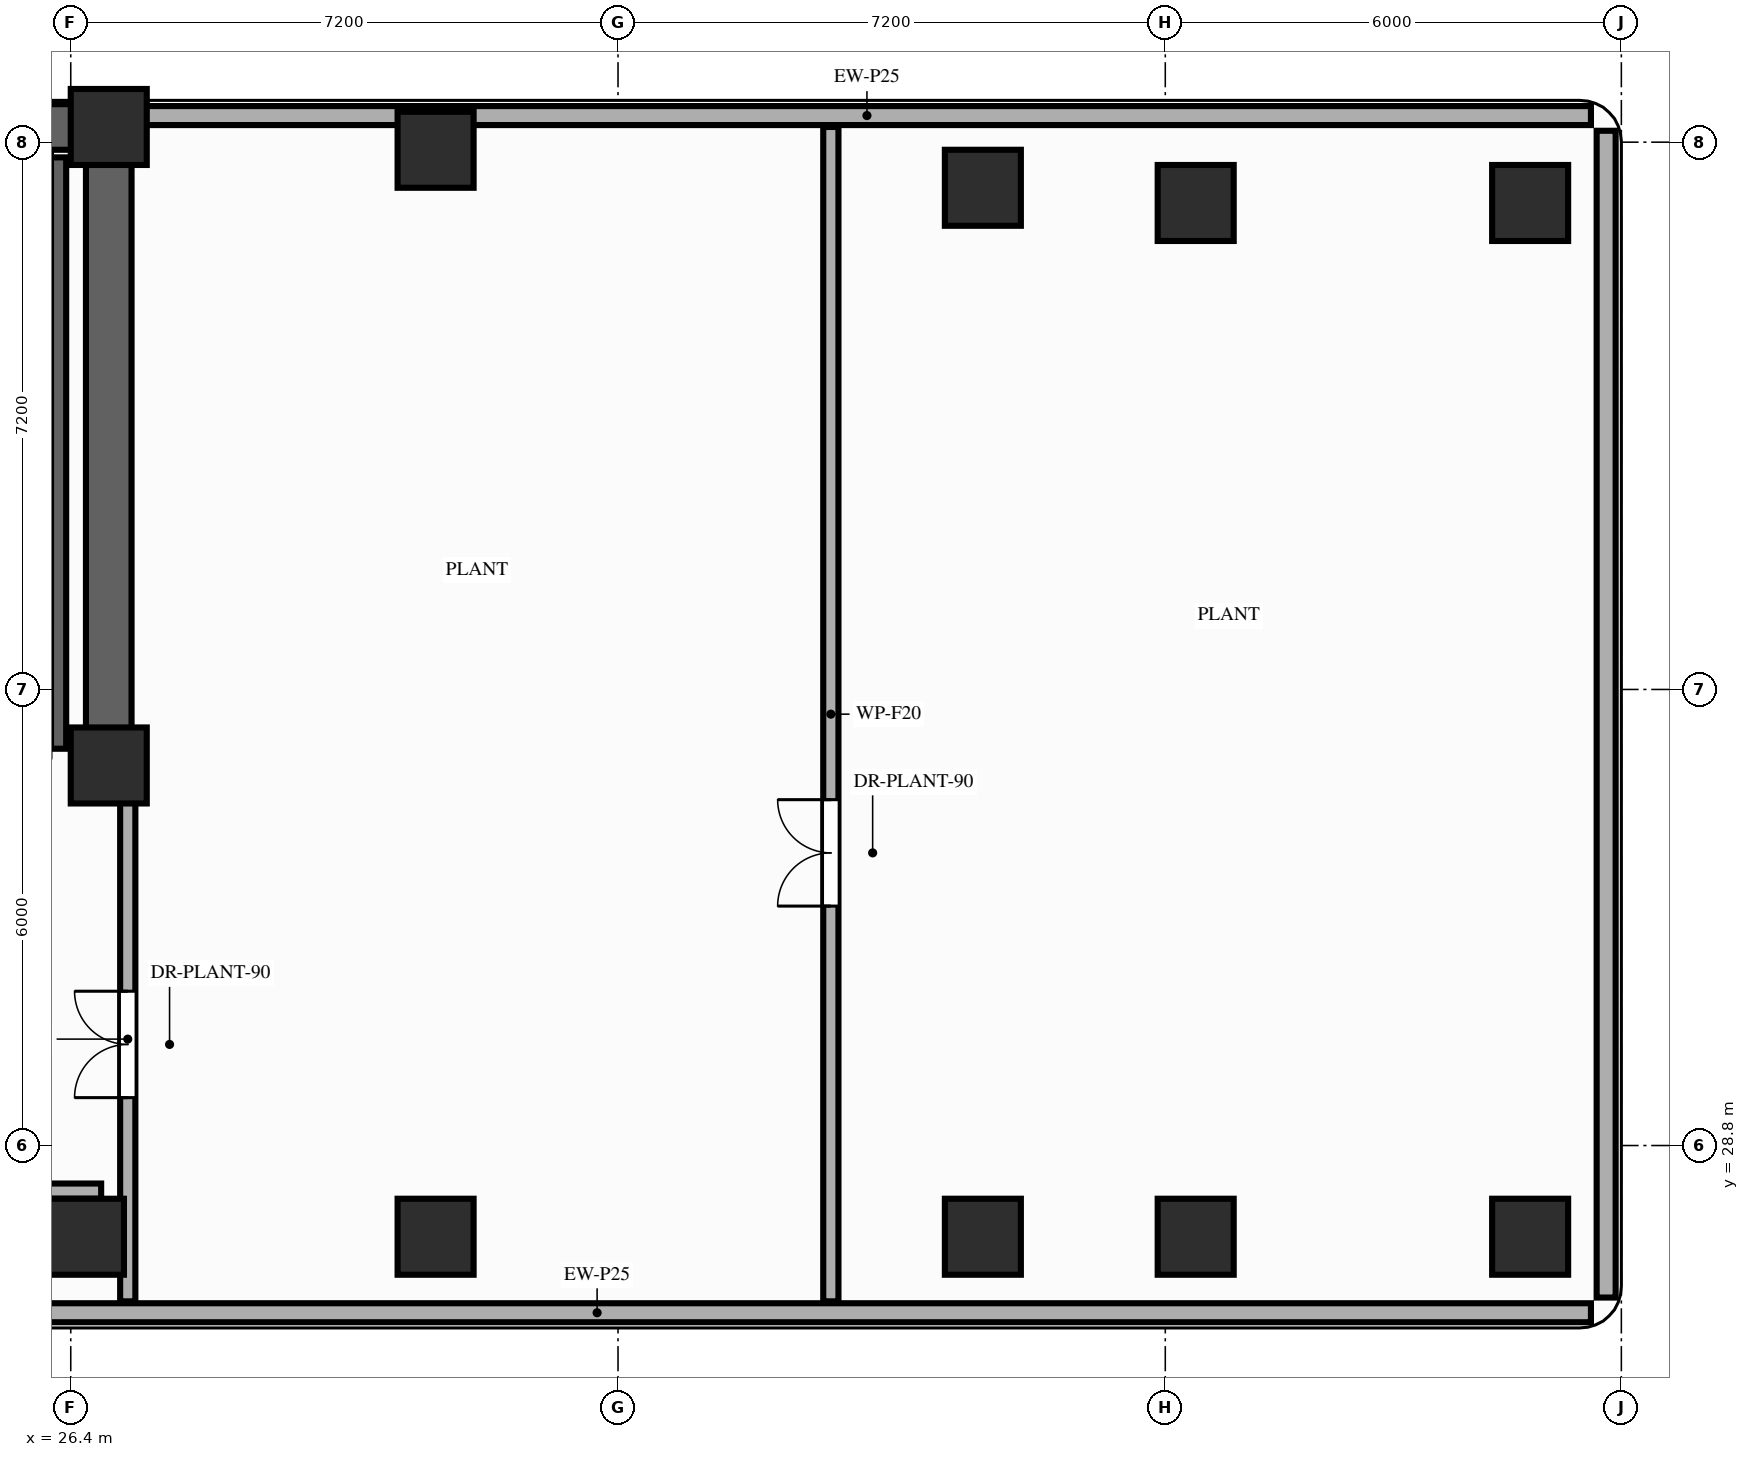
"""IFC4 building model, lengths in metres.
Left out: names, types, materials, properties, quantities, classifications, styles, units other than length and angle.
Written with IfcOpenShell. Run it as: python <this file> out.ifc"""

import sys

from ifc_helpers import new_model, si_unit, direction, frame, frame_2d, origin, origin_2d, place, context, subcontext, project, spatial, rectangle, extrude, element, fill, save


model = new_model("IFC4")
c1 = context("Model", 3, precision=1e-05, world=origin(), true_north=direction((0.0, 1.0)))
c2 = subcontext(c1, "Body", "Model", "MODEL_VIEW")
j1 = project(units=[si_unit("LENGTHUNIT", "METRE"), si_unit("PLANEANGLEUNIT", "RADIAN")], contexts=[c1])
p1 = place(None, origin())
s1 = spatial("IfcSite", under=j1, at=p1, CompositionType="ELEMENT")
p2 = place(p1, origin())
s2 = spatial("IfcBuilding", under=s1, at=p2, CompositionType="ELEMENT")
p3 = place(p2, frame((0.0, 0.0, 156.0)))
s3 = spatial("IfcBuildingStorey", under=s2, at=p3, CompositionType="ELEMENT", Elevation=156.0)
for number, where, z_axis, x_axis in (
    (1, (26.9, 33.8, 0.0), (0.0, 0.0, 1.0), (1.0, 0.0, 0.0)),
    (2, (26.9, 42.2, 0.0), (0.0, 0.0, 1.0), (1.0, 0.0, 0.0)),
    (3, (26.6, 27.6, 0.0), (0.0, 0.0, 1.0), (1.0, 0.0, 0.0)),
    (4, (31.2, 27.6, 0.0), (0.0, 0.0, 1.0), (1.0, 0.0, 0.0)),
    (5, (31.2, 41.9, 0.0), (0.0, 0.0, 1.0), (1.0, 0.0, 0.0)),
    (6, (38.4, 27.6, 0.0), (0.0, 0.0, 1.0), (1.0, 0.0, 0.0)),
    (7, (38.4, 41.4, 0.0), (0.0, 0.0, 1.0), (1.0, 0.0, 0.0)),
    (8, (41.2, 27.6, 0.0), (0.0, 0.0, 1.0), (1.0, 0.0, 0.0)),
    (9, (41.2, 41.2, 0.0), (0.0, 0.0, 1.0), (1.0, 0.0, 0.0)),
    (10, (45.6, 27.6, 0.0), (0.0, 0.0, 1.0), (1.0, 0.0, 0.0)),
    (11, (45.6, 41.2, 0.0), (0.0, 0.0, 1.0), (1.0, 0.0, 0.0)),
):
    element("IfcColumn", number, at=place(p3, frame(where, z_axis=z_axis, x_axis=x_axis)), inside=s3, PredefinedType="COLUMN", context=c2, shape_type="SweptSolid", body=[
        extrude(rectangle(XDim=1.0, YDim=1.0, at=origin_2d()), origin(), (0.0, 0.0, 1.0), 4.0),
    ])
p4 = place(p3, frame((46.4, 42.35, 0.0), z_axis=(0.0, 0.0, 1.0), x_axis=(-1.0, 0.0, 0.0)))
e12 = element("IfcWall", 12, at=p4, inside=s3, PredefinedType="STANDARD", context=c2, shape_type="SweptSolid", body=[
    extrude(rectangle(XDim=19.05, YDim=0.25, at=frame_2d((9.525, 0.0))), origin(), (0.0, 0.0, 1.0), 3.25),
])
p5 = place(p3, frame((20.25, 26.6, 0.0), z_axis=(0.0, 0.0, 1.0), x_axis=(1.0, 0.0, 0.0)))
e13 = element("IfcWall", 13, at=p5, inside=s3, PredefinedType="STANDARD", context=c2, shape_type="SweptSolid", body=[
    extrude(rectangle(XDim=26.15, YDim=0.25, at=frame_2d((13.075, 0.0))), origin(), (0.0, 0.0, 1.0), 3.82),
])
p6 = place(p3, frame((46.6, 26.8, 0.0), z_axis=(0.0, 0.0, 1.0), x_axis=(0.0, 1.0, 0.0)))
e14 = element("IfcWall", 14, at=p6, inside=s3, PredefinedType="STANDARD", context=c2, shape_type="SweptSolid", body=[
    extrude(rectangle(XDim=15.35, YDim=0.25, at=frame_2d((7.675, 0.0))), origin(), (0.0, 0.0, 1.0), 3.82),
])
p7 = place(p3, frame((6.45, 42.2, 0.0), z_axis=(0.0, 0.0, 1.0), x_axis=(1.0, 0.0, 0.0)))
e15 = element("IfcWall", 15, at=p7, inside=s3, PredefinedType="SHEAR", context=c2, shape_type="SweptSolid", body=[
    extrude(rectangle(XDim=20.45, YDim=0.6, at=frame_2d((10.225, 0.0))), origin(), (0.0, 0.0, 1.0), 3.82),
])
p8 = place(p3, frame((26.9, 33.8, 0.0), z_axis=(0.0, 0.0, 1.0), x_axis=(0.0, 1.0, 0.0)))
e16 = element("IfcWall", 16, at=p8, inside=s3, PredefinedType="SHEAR", context=c2, shape_type="SweptSolid", body=[
    extrude(rectangle(XDim=7.95, YDim=0.6, at=frame_2d((3.975, 0.0))), origin(), (0.0, 0.0, 1.0), 3.82),
])
p9 = place(p3, frame((26.24, 34.02, 0.0), z_axis=(0.0, 0.0, 1.0), x_axis=(0.0, 1.0, 0.0)))
e17 = element("IfcWall", 17, at=p9, inside=s3, PredefinedType="SHEAR", context=c2, shape_type="SweptSolid", body=[
    extrude(rectangle(XDim=7.78, YDim=0.2, at=frame_2d((3.89, 0.0))), origin(), (0.0, 0.0, 1.0), 3.82),
])
p10 = place(p3, frame((12.75, 28.2, 0.0), z_axis=(0.0, 0.0, 1.0), x_axis=(1.0, 0.0, 0.0)))
e18 = element("IfcWall", 18, at=p10, inside=s3, PredefinedType="PARTITIONING", context=c2, shape_type="SweptSolid", body=[
    extrude(rectangle(XDim=14.05, YDim=0.2, at=frame_2d((7.025, 0.0))), origin(), (0.0, 0.0, 1.0), 3.25),
])
p11 = place(p10, frame((3.2, 0.0, 0.0)))
e19 = element("IfcOpeningElement", 19, at=p11, cuts=e18, PredefinedType="OPENING", context=c2, shape_type="SweptSolid", body=[
    extrude(rectangle(XDim=1.1, YDim=2.15, at=frame_2d((0.55, 1.075))), frame((0.0, 0.11, 0.0), z_axis=(0.0, -1.0, 0.0), x_axis=(1.0, 0.0, 0.0)), (0.0, 0.0, 1.0), 0.22),
])
p12 = place(p3, frame((27.15, 26.75, 0.0), z_axis=(0.0, 0.0, 1.0), x_axis=(0.0, 1.0, 0.0)))
e20 = element("IfcWall", 20, at=p12, inside=s3, PredefinedType="PARTITIONING", context=c2, shape_type="SweptSolid", body=[
    extrude(rectangle(XDim=6.9, YDim=0.2, at=frame_2d((3.45, 0.0))), origin(), (0.0, 0.0, 1.0), 3.25),
])
p13 = place(p12, frame((2.68, 0.0, 0.0)))
e21 = element("IfcOpeningElement", 21, at=p13, cuts=e20, PredefinedType="OPENING", context=c2, shape_type="SweptSolid", body=[
    extrude(rectangle(XDim=1.4, YDim=2.2, at=frame_2d((0.7, 1.1))), frame((0.0, 0.11, 0.0), z_axis=(0.0, -1.0, 0.0), x_axis=(1.0, 0.0, 0.0)), (0.0, 0.0, 1.0), 0.22),
])
p14 = place(p3, frame((36.4, 26.75, 0.0), z_axis=(0.0, 0.0, 1.0), x_axis=(0.0, 1.0, 0.0)))
e22 = element("IfcWall", 22, at=p14, inside=s3, PredefinedType="PARTITIONING", context=c2, shape_type="SweptSolid", body=[
    extrude(rectangle(XDim=15.45, YDim=0.2, at=frame_2d((7.725, 0.0))), origin(), (0.0, 0.0, 1.0), 3.82),
])
p15 = place(p14, frame((5.2, 0.0, 0.0)))
e23 = element("IfcOpeningElement", 23, at=p15, cuts=e22, PredefinedType="OPENING", context=c2, shape_type="SweptSolid", body=[
    extrude(rectangle(XDim=1.4, YDim=2.2, at=frame_2d((0.7, 1.1))), frame((0.0, 0.11, 0.0), z_axis=(0.0, -1.0, 0.0), x_axis=(1.0, 0.0, 0.0)), (0.0, 0.0, 1.0), 0.22),
])
p16 = place(p13, origin())
e24 = element("IfcDoor", 24, at=p16, inside=s3, OperationType="DOUBLE_DOOR_SINGLE_SWING", PredefinedType="DOOR", context=c2, shape_type="SweptSolid", body=[
    extrude(rectangle(XDim=1.4, YDim=2.2, at=frame_2d((0.7, 1.1))), frame((0.0, 0.025, 0.0), z_axis=(0.0, -1.0, 0.0), x_axis=(1.0, 0.0, 0.0)), (0.0, 0.0, 1.0), 0.05),
])
fill(e21, e24)
p17 = place(p15, origin())
e25 = element("IfcDoor", 25, at=p17, inside=s3, OperationType="DOUBLE_DOOR_SINGLE_SWING", PredefinedType="DOOR", context=c2, shape_type="SweptSolid", body=[
    extrude(rectangle(XDim=1.4, YDim=2.2, at=frame_2d((0.7, 1.1))), frame((0.0, 0.025, 0.0), z_axis=(0.0, -1.0, 0.0), x_axis=(1.0, 0.0, 0.0)), (0.0, 0.0, 1.0), 0.05),
])
fill(e23, e25)
save(model, sys.argv[1])
